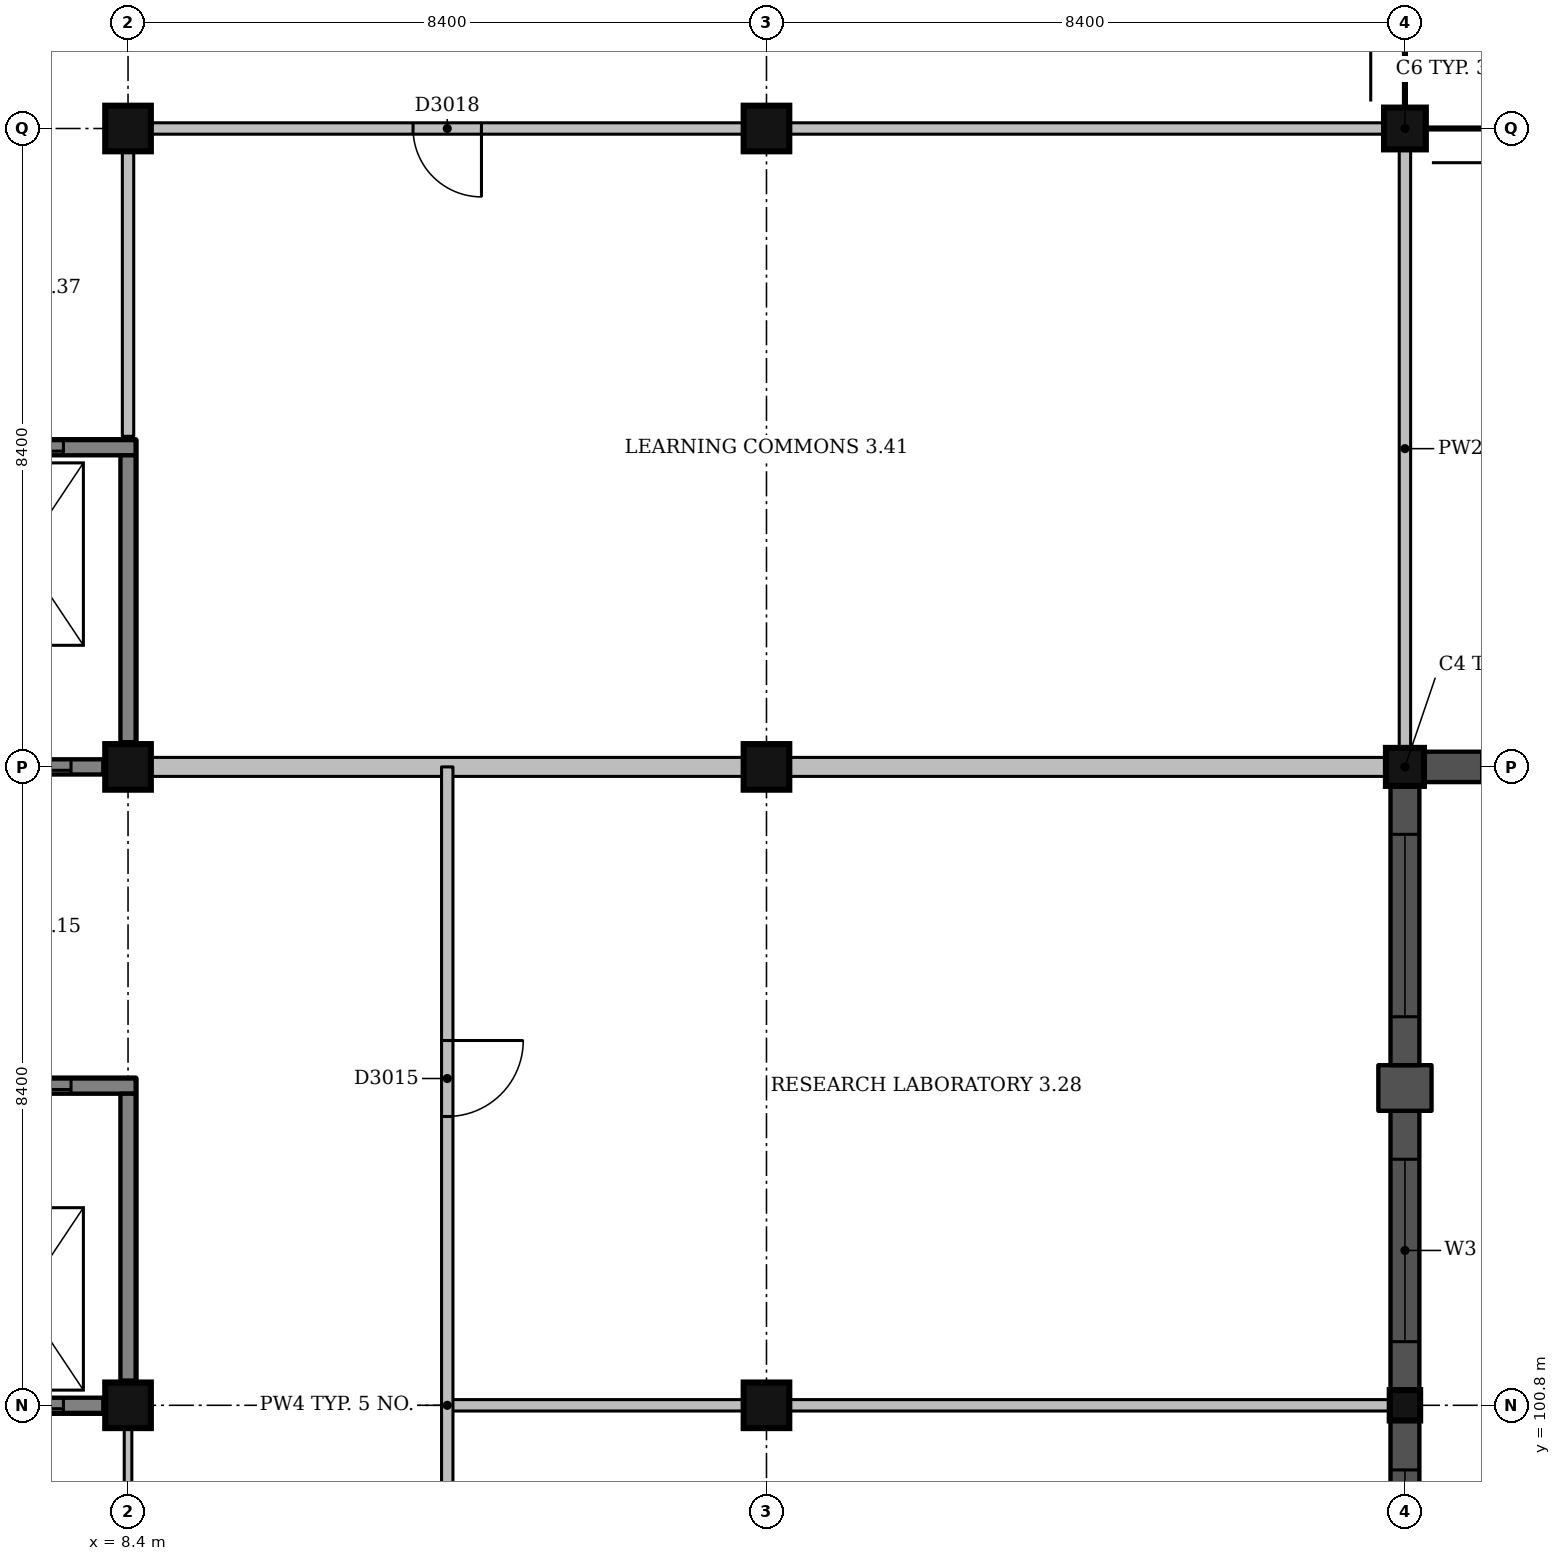
"""IFC4 building model, lengths in metres.
Left out: names, types, materials, properties, quantities, classifications, styles, units other than length and angle.
Written with IfcOpenShell. Run it as: python <this file> out.ifc"""

import sys

from ifc_helpers import new_model, si_unit, direction, frame, frame_2d, origin, origin_2d, place, context, subcontext, project, spatial, rectangle, extrude, element, fill, save


model = new_model("IFC4")
c1 = context("Model", 3, precision=1e-05, world=origin(), true_north=direction((0.0, 1.0)))
c2 = subcontext(c1, "Body", "Model", "MODEL_VIEW")
j1 = project(units=[si_unit("LENGTHUNIT", "METRE"), si_unit("PLANEANGLEUNIT", "RADIAN")], contexts=[c1])
p1 = place(None, origin())
s1 = spatial("IfcSite", under=j1, at=p1, CompositionType="ELEMENT")
p2 = place(p1, origin())
s2 = spatial("IfcBuilding", under=s1, at=p2, CompositionType="ELEMENT")
p3 = place(p2, frame((0.0, 0.0, 13.5)))
s3 = spatial("IfcBuildingStorey", under=s2, at=p3, CompositionType="ELEMENT", Elevation=13.5)
for number, where, z_axis, x_axis in (
    (1, (8.4, 100.8, 0.0), (0.0, 0.0, 1.0), (1.0, 0.0, 0.0)),
    (2, (8.4, 109.2, 0.0), (0.0, 0.0, 1.0), (1.0, 0.0, 0.0)),
    (3, (16.8, 100.8, 0.0), (0.0, 0.0, 1.0), (1.0, 0.0, 0.0)),
    (4, (16.8, 109.2, 0.0), (0.0, 0.0, 1.0), (1.0, 0.0, 0.0)),
):
    element("IfcColumn", number, at=place(p3, frame(where, z_axis=z_axis, x_axis=x_axis)), inside=s3, PredefinedType="COLUMN", context=c2, shape_type="SweptSolid", body=[
        extrude(rectangle(XDim=0.6, YDim=0.6, at=origin_2d()), origin(), (0.0, 0.0, 1.0), 4.5),
    ])
p4 = place(p3, frame((25.2, 100.8, 0.0), z_axis=(0.0, 0.0, 1.0), x_axis=(1.0, 0.0, 0.0)))
e5 = element("IfcColumn", 5, at=p4, inside=s3, PredefinedType="COLUMN", context=c2, shape_type="SweptSolid", body=[
    extrude(rectangle(XDim=0.4, YDim=0.4, at=origin_2d()), origin(), (0.0, 0.0, 1.0), 4.5),
])
p5 = place(p3, frame((25.2, 109.2, 0.0), z_axis=(0.0, 0.0, 1.0), x_axis=(1.0, 0.0, 0.0)))
e6 = element("IfcColumn", 6, at=p5, inside=s3, PredefinedType="COLUMN", context=c2, shape_type="SweptSolid", body=[
    extrude(rectangle(XDim=0.5, YDim=0.5, at=origin_2d()), origin(), (0.0, 0.0, 1.0), 4.5),
])
for number, where, z_axis, x_axis in (
    (7, (8.4, 117.6, 0.0), (0.0, 0.0, 1.0), (1.0, 0.0, 0.0)),
    (8, (16.8, 117.6, 0.0), (0.0, 0.0, 1.0), (1.0, 0.0, 0.0)),
):
    element("IfcColumn", number, at=place(p3, frame(where, z_axis=z_axis, x_axis=x_axis)), inside=s3, PredefinedType="COLUMN", context=c2, shape_type="SweptSolid", body=[
        extrude(rectangle(XDim=0.6, YDim=0.6, at=origin_2d()), origin(), (0.0, 0.0, 1.0), 4.5),
    ])
p6 = place(p3, frame((25.2, 117.6, 0.0), z_axis=(0.0, 0.0, 1.0), x_axis=(1.0, 0.0, 0.0)))
e9 = element("IfcColumn", 9, at=p6, inside=s3, PredefinedType="COLUMN", context=c2, shape_type="SweptSolid", body=[
    extrude(rectangle(XDim=0.55, YDim=0.55, at=origin_2d()), origin(), (0.0, 0.0, 1.0), 4.5),
])
p7 = place(p3, frame((5.5, 100.8, 0.0), z_axis=(0.0, 0.0, 1.0), x_axis=(1.0, 0.0, 0.0)))
e10 = element("IfcWall", 10, at=p7, inside=s3, PredefinedType="SHEAR", context=c2, shape_type="SweptSolid", body=[
    extrude(rectangle(XDim=2.575, YDim=0.2, at=frame_2d((1.288, 0.0))), origin(), (0.0, 0.0, 1.0), 4.5),
])
p8 = place(p7, frame((0.95, 0.0, 0.0)))
e11 = element("IfcOpeningElement", 11, at=p8, cuts=e10, PredefinedType="OPENING", context=c2, shape_type="SweptSolid", body=[
    extrude(rectangle(XDim=1.1, YDim=2.1, at=frame_2d((0.55, 1.05))), frame((0.0, 0.11, 0.0), z_axis=(0.0, -1.0, 0.0), x_axis=(1.0, 0.0, 0.0)), (0.0, 0.0, 1.0), 0.22),
])
p9 = place(p3, frame((5.5, 105.0, 0.0), z_axis=(0.0, 0.0, 1.0), x_axis=(1.0, 0.0, 0.0)))
e12 = element("IfcWall", 12, at=p9, inside=s3, PredefinedType="SHEAR", context=c2, shape_type="SweptSolid", body=[
    extrude(rectangle(XDim=3.0, YDim=0.2, at=frame_2d((1.5, 0.0))), origin(), (0.0, 0.0, 1.0), 4.5),
])
p10 = place(p9, frame((1.05, 0.0, 0.0)))
e13 = element("IfcOpeningElement", 13, at=p10, cuts=e12, PredefinedType="OPENING", context=c2, shape_type="SweptSolid", body=[
    extrude(rectangle(XDim=1.1, YDim=2.1, at=frame_2d((0.55, 1.05))), frame((0.0, 0.11, 0.0), z_axis=(0.0, -1.0, 0.0), x_axis=(1.0, 0.0, 0.0)), (0.0, 0.0, 1.0), 0.22),
])
p11 = place(p3, frame((8.4, 101.125, 0.0), z_axis=(0.0, 0.0, 1.0), x_axis=(0.0, 1.0, 0.0)))
e14 = element("IfcWall", 14, at=p11, inside=s3, PredefinedType="SHEAR", context=c2, shape_type="SweptSolid", body=[
    extrude(rectangle(XDim=3.775, YDim=0.2, at=frame_2d((1.887, 0.0))), origin(), (0.0, 0.0, 1.0), 4.5),
])
p12 = place(p3, frame((5.5, 109.2, 0.0), z_axis=(0.0, 0.0, 1.0), x_axis=(1.0, 0.0, 0.0)))
e15 = element("IfcWall", 15, at=p12, inside=s3, PredefinedType="SHEAR", context=c2, shape_type="SweptSolid", body=[
    extrude(rectangle(XDim=2.575, YDim=0.2, at=frame_2d((1.288, 0.0))), origin(), (0.0, 0.0, 1.0), 4.5),
])
p13 = place(p12, frame((1.05, 0.0, 0.0)))
e16 = element("IfcOpeningElement", 16, at=p13, cuts=e15, PredefinedType="OPENING", context=c2, shape_type="SweptSolid", body=[
    extrude(rectangle(XDim=1.1, YDim=2.1, at=frame_2d((0.55, 1.05))), frame((0.0, 0.11, 0.0), z_axis=(0.0, -1.0, 0.0), x_axis=(1.0, 0.0, 0.0)), (0.0, 0.0, 1.0), 0.22),
])
p14 = place(p3, frame((5.5, 113.4, 0.0), z_axis=(0.0, 0.0, 1.0), x_axis=(1.0, 0.0, 0.0)))
e17 = element("IfcWall", 17, at=p14, inside=s3, PredefinedType="SHEAR", context=c2, shape_type="SweptSolid", body=[
    extrude(rectangle(XDim=3.0, YDim=0.2, at=frame_2d((1.5, 0.0))), origin(), (0.0, 0.0, 1.0), 4.5),
])
p15 = place(p14, frame((0.95, 0.0, 0.0)))
e18 = element("IfcOpeningElement", 18, at=p15, cuts=e17, PredefinedType="OPENING", context=c2, shape_type="SweptSolid", body=[
    extrude(rectangle(XDim=1.1, YDim=2.1, at=frame_2d((0.55, 1.05))), frame((0.0, 0.11, 0.0), z_axis=(0.0, -1.0, 0.0), x_axis=(1.0, 0.0, 0.0)), (0.0, 0.0, 1.0), 0.22),
])
p16 = place(p3, frame((8.4, 109.525, 0.0), z_axis=(0.0, 0.0, 1.0), x_axis=(0.0, 1.0, 0.0)))
e19 = element("IfcWall", 19, at=p16, inside=s3, PredefinedType="SHEAR", context=c2, shape_type="SweptSolid", body=[
    extrude(rectangle(XDim=3.775, YDim=0.2, at=frame_2d((1.888, 0.0))), origin(), (0.0, 0.0, 1.0), 4.5),
])
p17 = place(p3, frame((25.2, 96.9, 0.0), z_axis=(0.0, 0.0, 1.0), x_axis=(0.0, 1.0, 0.0)))
e20 = element("IfcWall", 20, at=p17, inside=s3, PredefinedType="SOLIDWALL", context=c2, shape_type="SweptSolid", body=[
    extrude(rectangle(XDim=3.7, YDim=0.38, at=frame_2d((1.85, 0.0))), origin(), (0.0, 0.0, 1.0), 3.35),
])
p18 = place(p17, frame((0.65, 0.0, 1.2)))
e21 = element("IfcOpeningElement", 21, at=p18, cuts=e20, PredefinedType="OPENING", context=c2, shape_type="SweptSolid", body=[
    extrude(rectangle(XDim=2.4, YDim=1.5, at=frame_2d((1.2, 0.75))), frame((0.0, 0.2, 0.0), z_axis=(0.0, -1.0, 0.0), x_axis=(1.0, 0.0, 0.0)), (0.0, 0.0, 1.0), 0.4),
])
p19 = place(p3, frame((25.2, 101.0, 0.0), z_axis=(0.0, 0.0, 1.0), x_axis=(0.0, 1.0, 0.0)))
e22 = element("IfcWall", 22, at=p19, inside=s3, PredefinedType="SOLIDWALL", context=c2, shape_type="SweptSolid", body=[
    extrude(rectangle(XDim=3.675, YDim=0.38, at=frame_2d((1.837, 0.0))), origin(), (0.0, 0.0, 1.0), 3.35),
])
p20 = place(p19, frame((0.637, 0.0, 1.2)))
e23 = element("IfcOpeningElement", 23, at=p20, cuts=e22, PredefinedType="OPENING", context=c2, shape_type="SweptSolid", body=[
    extrude(rectangle(XDim=2.4, YDim=1.5, at=frame_2d((1.2, 0.75))), frame((0.0, 0.2, 0.0), z_axis=(0.0, -1.0, 0.0), x_axis=(1.0, 0.0, 0.0)), (0.0, 0.0, 1.0), 0.4),
])
p21 = place(p3, frame((25.2, 104.675, 0.0), z_axis=(0.0, 0.0, 1.0), x_axis=(0.0, 1.0, 0.0)))
e24 = element("IfcWall", 24, at=p21, inside=s3, PredefinedType="SOLIDWALL", context=c2, shape_type="SweptSolid", body=[
    extrude(rectangle(XDim=0.6, YDim=0.7, at=frame_2d((0.3, 0.0))), origin(), (0.0, 0.0, 1.0), 3.35),
])
p22 = place(p3, frame((25.2, 105.275, 0.0), z_axis=(0.0, 0.0, 1.0), x_axis=(0.0, 1.0, 0.0)))
e25 = element("IfcWall", 25, at=p22, inside=s3, PredefinedType="SOLIDWALL", context=c2, shape_type="SweptSolid", body=[
    extrude(rectangle(XDim=3.675, YDim=0.38, at=frame_2d((1.837, 0.0))), origin(), (0.0, 0.0, 1.0), 3.35),
])
p23 = place(p22, frame((0.637, 0.0, 1.2)))
e26 = element("IfcOpeningElement", 26, at=p23, cuts=e25, PredefinedType="OPENING", context=c2, shape_type="SweptSolid", body=[
    extrude(rectangle(XDim=2.4, YDim=1.5, at=frame_2d((1.2, 0.75))), frame((0.0, 0.2, 0.0), z_axis=(0.0, -1.0, 0.0), x_axis=(1.0, 0.0, 0.0)), (0.0, 0.0, 1.0), 0.4),
])
p24 = place(p3, frame((25.45, 109.2, 0.0), z_axis=(0.0, 0.0, 1.0), x_axis=(1.0, 0.0, 0.0)))
e27 = element("IfcWall", 27, at=p24, inside=s3, PredefinedType="SOLIDWALL", context=c2, shape_type="SweptSolid", body=[
    extrude(rectangle(XDim=3.915, YDim=0.4, at=frame_2d((1.958, 0.0))), origin(), (0.0, 0.0, 1.0), 4.2),
])
p25 = place(p24, frame((0.758, 0.0, 0.6)))
e28 = element("IfcOpeningElement", 28, at=p25, cuts=e27, PredefinedType="OPENING", context=c2, shape_type="SweptSolid", body=[
    extrude(rectangle(XDim=2.4, YDim=2.4, at=frame_2d((1.2, 1.2))), frame((0.0, 0.21, 0.0), z_axis=(0.0, -1.0, 0.0), x_axis=(1.0, 0.0, 0.0)), (0.0, 0.0, 1.0), 0.42),
])
p26 = place(p3, frame((12.6, 100.8, 0.0), z_axis=(0.0, 0.0, 1.0), x_axis=(1.0, 0.0, 0.0)))
e29 = element("IfcWall", 29, at=p26, inside=s3, PredefinedType="PARTITIONING", context=c2, shape_type="SweptSolid", body=[
    extrude(rectangle(XDim=3.9, YDim=0.15, at=frame_2d((1.95, 0.0))), origin(), (0.0, 0.0, 1.0), 3.4),
])
p27 = place(p3, frame((17.1, 100.8, 0.0), z_axis=(0.0, 0.0, 1.0), x_axis=(1.0, 0.0, 0.0)))
e30 = element("IfcWall", 30, at=p27, inside=s3, PredefinedType="PARTITIONING", context=c2, shape_type="SweptSolid", body=[
    extrude(rectangle(XDim=7.9, YDim=0.15, at=frame_2d((3.95, 0.0))), origin(), (0.0, 0.0, 1.0), 3.35),
])
p28 = place(p3, frame((8.7, 109.2, 0.0), z_axis=(0.0, 0.0, 1.0), x_axis=(1.0, 0.0, 0.0)))
e31 = element("IfcWall", 31, at=p28, inside=s3, PredefinedType="SOLIDWALL", context=c2, shape_type="SweptSolid", body=[
    extrude(rectangle(XDim=7.8, YDim=0.25, at=frame_2d((3.9, 0.0))), origin(), (0.0, 0.0, 1.0), 4.15),
])
p29 = place(p3, frame((17.1, 109.2, 0.0), z_axis=(0.0, 0.0, 1.0), x_axis=(1.0, 0.0, 0.0)))
e32 = element("IfcWall", 32, at=p29, inside=s3, PredefinedType="SOLIDWALL", context=c2, shape_type="SweptSolid", body=[
    extrude(rectangle(XDim=7.85, YDim=0.25, at=frame_2d((3.925, 0.0))), origin(), (0.0, 0.0, 1.0), 3.35),
])
p30 = place(p3, frame((8.7, 117.6, 0.0), z_axis=(0.0, 0.0, 1.0), x_axis=(1.0, 0.0, 0.0)))
e33 = element("IfcWall", 33, at=p30, inside=s3, PredefinedType="PARTITIONING", context=c2, shape_type="SweptSolid", body=[
    extrude(rectangle(XDim=7.8, YDim=0.15, at=frame_2d((3.9, 0.0))), origin(), (0.0, 0.0, 1.0), 3.4),
])
p31 = place(p30, frame((3.45, 0.0, 0.0)))
e34 = element("IfcOpeningElement", 34, at=p31, cuts=e33, PredefinedType="OPENING", context=c2, shape_type="SweptSolid", body=[
    extrude(rectangle(XDim=0.9, YDim=2.1, at=frame_2d((0.45, 1.05))), frame((0.0, 0.085, 0.0), z_axis=(0.0, -1.0, 0.0), x_axis=(1.0, 0.0, 0.0)), (0.0, 0.0, 1.0), 0.17),
])
p32 = place(p3, frame((17.1, 117.6, 0.0), z_axis=(0.0, 0.0, 1.0), x_axis=(1.0, 0.0, 0.0)))
e35 = element("IfcWall", 35, at=p32, inside=s3, PredefinedType="PARTITIONING", context=c2, shape_type="SweptSolid", body=[
    extrude(rectangle(XDim=7.825, YDim=0.15, at=frame_2d((3.913, 0.0))), origin(), (0.0, 0.0, 1.0), 3.4),
])
p33 = place(p3, frame((8.4, 113.55, 0.0), z_axis=(0.0, 0.0, 1.0), x_axis=(0.0, 1.0, 0.0)))
e36 = element("IfcWall", 36, at=p33, inside=s3, PredefinedType="PARTITIONING", context=c2, shape_type="SweptSolid", body=[
    extrude(rectangle(XDim=3.75, YDim=0.15, at=frame_2d((1.875, 0.0))), origin(), (0.0, 0.0, 1.0), 3.4),
])
p34 = place(p3, frame((8.4, 92.7, 0.0), z_axis=(0.0, 0.0, 1.0), x_axis=(0.0, 1.0, 0.0)))
e37 = element("IfcWall", 37, at=p34, inside=s3, PredefinedType="PARTITIONING", context=c2, shape_type="SweptSolid", body=[
    extrude(rectangle(XDim=7.8, YDim=0.1, at=frame_2d((3.9, 0.0))), origin(), (0.0, 0.0, 1.0), 3.4),
])
p35 = place(p34, frame((0.65, 0.0, 0.0)))
e38 = element("IfcOpeningElement", 38, at=p35, cuts=e37, PredefinedType="OPENING", context=c2, shape_type="SweptSolid", body=[
    extrude(rectangle(XDim=0.9, YDim=2.1, at=frame_2d((0.45, 1.05))), frame((0.0, 0.06, 0.0), z_axis=(0.0, -1.0, 0.0), x_axis=(1.0, 0.0, 0.0)), (0.0, 0.0, 1.0), 0.12),
])
p36 = place(p34, frame((3.5, 0.0, 0.0)))
e39 = element("IfcOpeningElement", 39, at=p36, cuts=e37, PredefinedType="OPENING", context=c2, shape_type="SweptSolid", body=[
    extrude(rectangle(XDim=1.0, YDim=2.1, at=frame_2d((0.5, 1.05))), frame((0.0, 0.06, 0.0), z_axis=(0.0, -1.0, 0.0), x_axis=(1.0, 0.0, 0.0)), (0.0, 0.0, 1.0), 0.12),
])
p37 = place(p34, frame((5.95, 0.0, 0.0)))
e40 = element("IfcOpeningElement", 40, at=p37, cuts=e37, PredefinedType="OPENING", context=c2, shape_type="SweptSolid", body=[
    extrude(rectangle(XDim=0.9, YDim=2.1, at=frame_2d((0.45, 1.05))), frame((0.0, 0.06, 0.0), z_axis=(0.0, -1.0, 0.0), x_axis=(1.0, 0.0, 0.0)), (0.0, 0.0, 1.0), 0.12),
])
p38 = place(p3, frame((12.6, 92.4, 0.0), z_axis=(0.0, 0.0, 1.0), x_axis=(0.0, 1.0, 0.0)))
e41 = element("IfcWall", 41, at=p38, inside=s3, PredefinedType="PARTITIONING", context=c2, shape_type="SweptSolid", body=[
    extrude(rectangle(XDim=16.8, YDim=0.15, at=frame_2d((8.4, 0.0))), origin(), (0.0, 0.0, 1.0), 3.4),
])
p39 = place(p38, frame((3.8, 0.0, 0.0)))
e42 = element("IfcOpeningElement", 42, at=p39, cuts=e41, PredefinedType="OPENING", context=c2, shape_type="SweptSolid", body=[
    extrude(rectangle(XDim=1.0, YDim=2.1, at=frame_2d((0.5, 1.05))), frame((0.0, 0.085, 0.0), z_axis=(0.0, -1.0, 0.0), x_axis=(1.0, 0.0, 0.0)), (0.0, 0.0, 1.0), 0.17),
])
p40 = place(p38, frame((12.2, 0.0, 0.0)))
e43 = element("IfcOpeningElement", 43, at=p40, cuts=e41, PredefinedType="OPENING", context=c2, shape_type="SweptSolid", body=[
    extrude(rectangle(XDim=1.0, YDim=2.1, at=frame_2d((0.5, 1.05))), frame((0.0, 0.085, 0.0), z_axis=(0.0, -1.0, 0.0), x_axis=(1.0, 0.0, 0.0)), (0.0, 0.0, 1.0), 0.17),
])
p41 = place(p3, frame((25.2, 109.45, 0.0), z_axis=(0.0, 0.0, 1.0), x_axis=(0.0, 1.0, 0.0)))
e44 = element("IfcWall", 44, at=p41, inside=s3, PredefinedType="PARTITIONING", context=c2, shape_type="SweptSolid", body=[
    extrude(rectangle(XDim=7.875, YDim=0.15, at=frame_2d((3.938, 0.0))), origin(), (0.0, 0.0, 1.0), 4.15),
])
p42 = place(p18, origin())
e45 = element("IfcWindow", 45, at=p42, inside=s3, PartitioningType="SINGLE_PANEL", PredefinedType="WINDOW", context=c2, shape_type="SweptSolid", body=[
    extrude(rectangle(XDim=2.4, YDim=1.5, at=frame_2d((1.2, 0.75))), frame((0.0, 0.15, 0.0), z_axis=(0.0, -1.0, 0.0), x_axis=(1.0, 0.0, 0.0)), (0.0, 0.0, 1.0), 0.06),
])
fill(e21, e45)
p43 = place(p20, origin())
e46 = element("IfcWindow", 46, at=p43, inside=s3, PartitioningType="SINGLE_PANEL", PredefinedType="WINDOW", context=c2, shape_type="SweptSolid", body=[
    extrude(rectangle(XDim=2.4, YDim=1.5, at=frame_2d((1.2, 0.75))), frame((0.0, 0.15, 0.0), z_axis=(0.0, -1.0, 0.0), x_axis=(1.0, 0.0, 0.0)), (0.0, 0.0, 1.0), 0.06),
])
fill(e23, e46)
p44 = place(p23, origin())
e47 = element("IfcWindow", 47, at=p44, inside=s3, PartitioningType="SINGLE_PANEL", PredefinedType="WINDOW", context=c2, shape_type="SweptSolid", body=[
    extrude(rectangle(XDim=2.4, YDim=1.5, at=frame_2d((1.2, 0.75))), frame((0.0, 0.15, 0.0), z_axis=(0.0, -1.0, 0.0), x_axis=(1.0, 0.0, 0.0)), (0.0, 0.0, 1.0), 0.06),
])
fill(e26, e47)
p45 = place(p40, origin())
e48 = element("IfcDoor", 48, at=p45, inside=s3, OperationType="SINGLE_SWING_RIGHT", PredefinedType="DOOR", context=c2, shape_type="SweptSolid", body=[
    extrude(rectangle(XDim=1.0, YDim=2.1, at=frame_2d((0.5, 1.05))), frame((0.0, 0.025, 0.0), z_axis=(0.0, -1.0, 0.0), x_axis=(1.0, 0.0, 0.0)), (0.0, 0.0, 1.0), 0.05),
])
fill(e43, e48)
p46 = place(p31, origin())
e49 = element("IfcDoor", 49, at=p46, inside=s3, OperationType="SINGLE_SWING_RIGHT", PredefinedType="DOOR", context=c2, shape_type="SweptSolid", body=[
    extrude(rectangle(XDim=0.9, YDim=2.1, at=frame_2d((0.45, 1.05))), frame((0.0, 0.025, 0.0), z_axis=(0.0, -1.0, 0.0), x_axis=(1.0, 0.0, 0.0)), (0.0, 0.0, 1.0), 0.05),
])
fill(e34, e49)
p47 = place(p8, origin())
e50 = element("IfcDoor", 50, at=p47, inside=s3, OperationType="SLIDING_TO_LEFT", PredefinedType="DOOR", context=c2, shape_type="SweptSolid", body=[
    extrude(rectangle(XDim=1.1, YDim=2.1, at=frame_2d((0.55, 1.05))), frame((0.0, 0.025, 0.0), z_axis=(0.0, -1.0, 0.0), x_axis=(1.0, 0.0, 0.0)), (0.0, 0.0, 1.0), 0.05),
])
fill(e11, e50)
p48 = place(p10, origin())
e51 = element("IfcDoor", 51, at=p48, inside=s3, OperationType="SLIDING_TO_RIGHT", PredefinedType="DOOR", context=c2, shape_type="SweptSolid", body=[
    extrude(rectangle(XDim=1.1, YDim=2.1, at=frame_2d((0.55, 1.05))), frame((0.0, 0.025, 0.0), z_axis=(0.0, -1.0, 0.0), x_axis=(1.0, 0.0, 0.0)), (0.0, 0.0, 1.0), 0.05),
])
fill(e13, e51)
p49 = place(p13, origin())
e52 = element("IfcDoor", 52, at=p49, inside=s3, OperationType="SLIDING_TO_LEFT", PredefinedType="DOOR", context=c2, shape_type="SweptSolid", body=[
    extrude(rectangle(XDim=1.1, YDim=2.1, at=frame_2d((0.55, 1.05))), frame((0.0, 0.025, 0.0), z_axis=(0.0, -1.0, 0.0), x_axis=(1.0, 0.0, 0.0)), (0.0, 0.0, 1.0), 0.05),
])
fill(e16, e52)
p50 = place(p15, origin())
e53 = element("IfcDoor", 53, at=p50, inside=s3, OperationType="SLIDING_TO_RIGHT", PredefinedType="DOOR", context=c2, shape_type="SweptSolid", body=[
    extrude(rectangle(XDim=1.1, YDim=2.1, at=frame_2d((0.55, 1.05))), frame((0.0, 0.025, 0.0), z_axis=(0.0, -1.0, 0.0), x_axis=(1.0, 0.0, 0.0)), (0.0, 0.0, 1.0), 0.05),
])
fill(e18, e53)
save(model, sys.argv[1])
